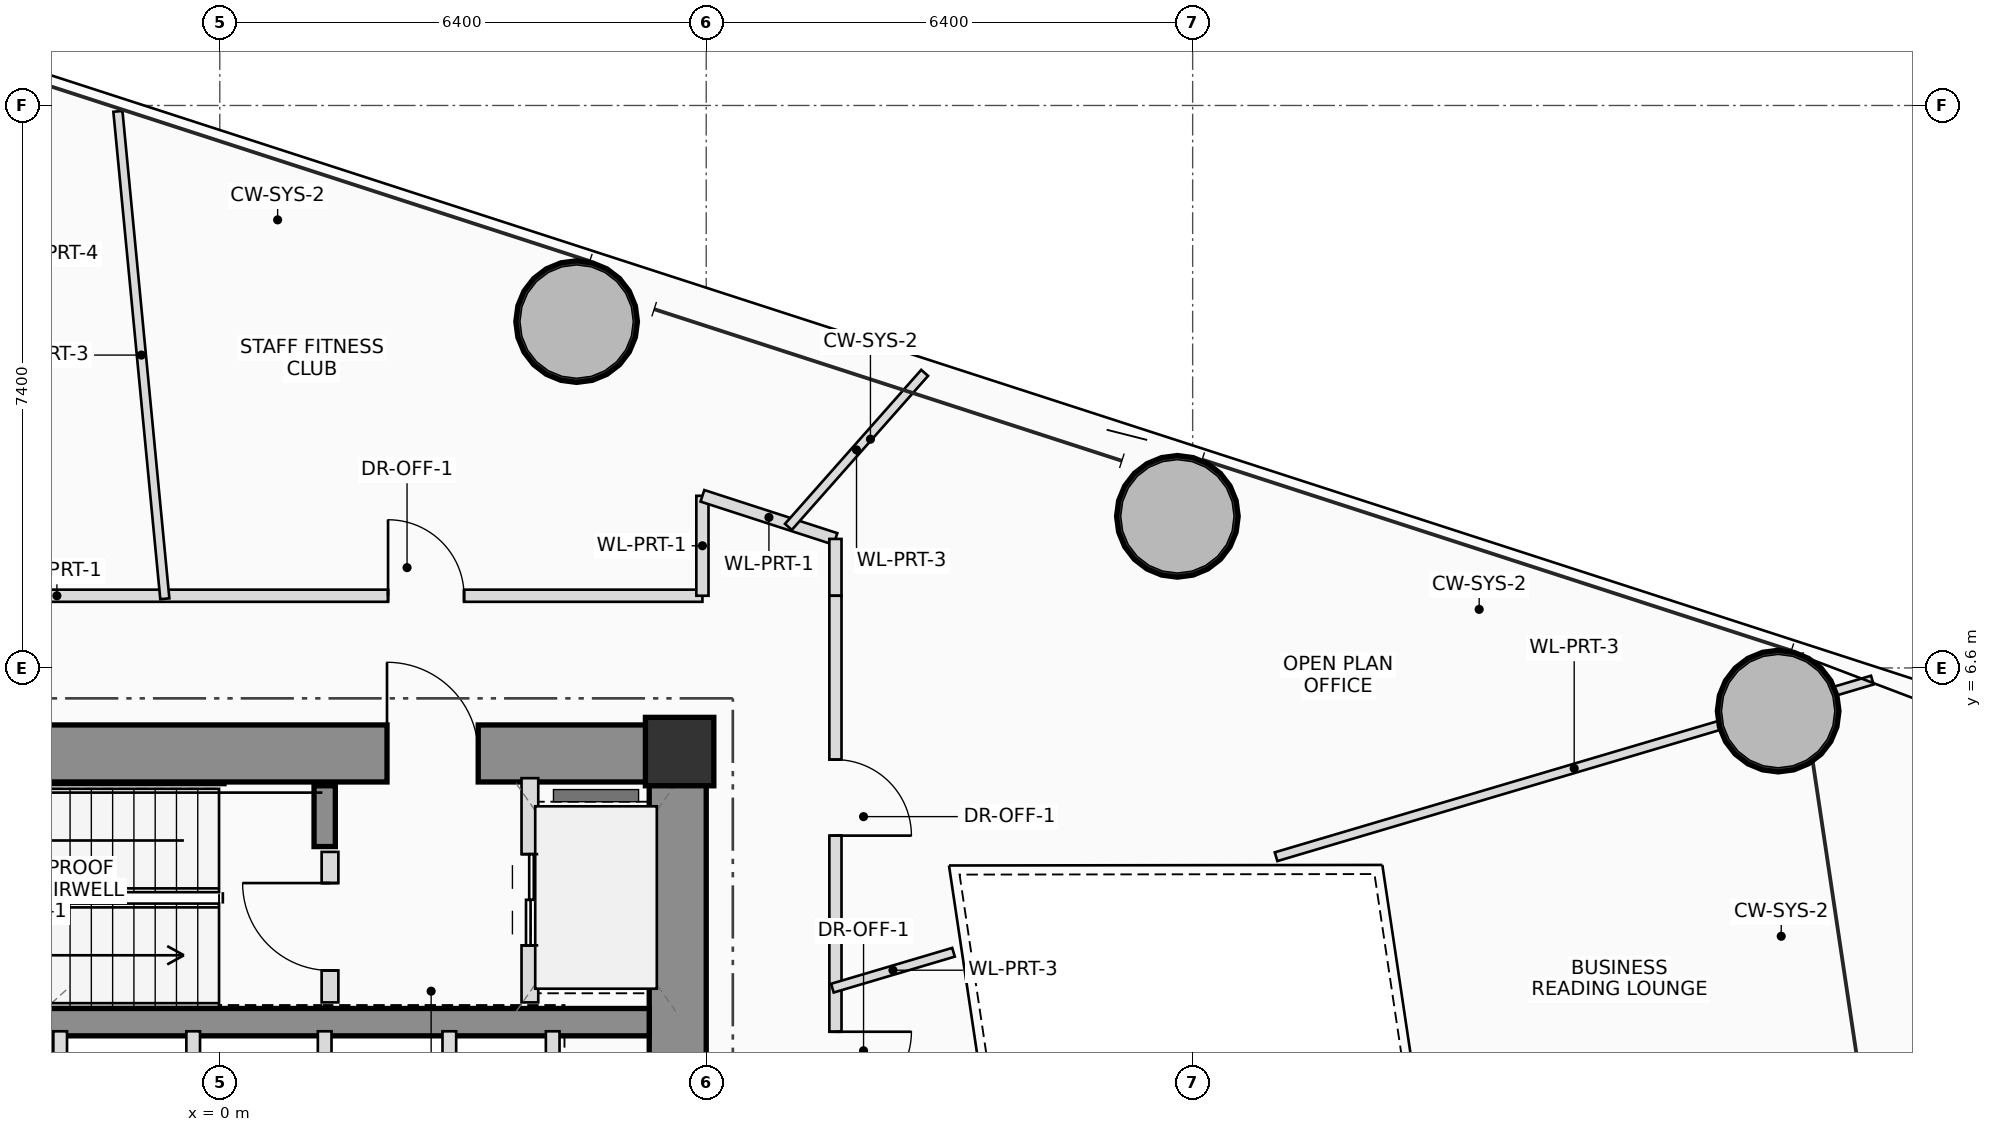
"""IFC4 building model, lengths in metres.
Left out: names, types, materials, properties, quantities, classifications, styles, units other than length and angle.
Written with IfcOpenShell. Run it as: python <this file> out.ifc"""

import sys

from ifc_helpers import new_model, si_unit, direction, frame, frame_2d, origin, origin_2d, place, context, subcontext, project, spatial, rectangle, hollow_circle, extrude, source, transform, mapped, element, fill, save


model = new_model("IFC4")
c1 = context("Model", 3, precision=1e-05, world=origin(), true_north=direction((0.0, 1.0)))
c2 = subcontext(c1, "Body", "Model", "MODEL_VIEW")
j1 = project(units=[si_unit("LENGTHUNIT", "METRE"), si_unit("PLANEANGLEUNIT", "RADIAN")], contexts=[c1])
p1 = place(None, origin())
s1 = spatial("IfcSite", under=j1, at=p1, CompositionType="ELEMENT")
p2 = place(p1, origin())
s2 = spatial("IfcBuilding", under=s1, at=p2, CompositionType="ELEMENT")
p3 = place(p2, frame((0.0, 0.0, 69.8)))
s3 = spatial("IfcBuildingStorey", under=s2, at=p3, CompositionType="ELEMENT", Elevation=69.8)
m1 = source(origin(), c2, "Body", "SweptSolid", [
    extrude(rectangle(XDim=0.9, YDim=0.9, at=origin_2d()), origin(), (0.0, 0.0, 1.0), 3.75),
])
p4 = place(p3, frame((6.05, 5.5, 0.0), z_axis=(0.0, 0.0, 1.0), x_axis=(1.0, 0.0, 0.0)))
e1 = element("IfcColumn", 1, at=p4, inside=s3, PredefinedType="COLUMN", context=c2, shape_type="MappedRepresentation", body=[
    mapped(m1, transform((0.0, 0.0, 0.0), scale=1.0)),
])
p5 = place(p3, frame((-6.4, 5.475, 0.0), z_axis=(0.0, 0.0, 1.0), x_axis=(1.0, 0.0, 0.0)))
e2 = element("IfcWall", 2, at=p5, inside=s3, PredefinedType="SHEAR", context=c2, shape_type="SweptSolid", body=[
    extrude(rectangle(XDim=12.8, YDim=0.75, at=frame_2d((6.4, 0.0))), origin(), (0.0, 0.0, 1.0), 3.75),
])
p6 = place(p5, frame((8.6, 0.0, 0.0)))
e3 = element("IfcOpeningElement", 3, at=p6, cuts=e2, PredefinedType="OPENING", context=c2, shape_type="SweptSolid", body=[
    extrude(rectangle(XDim=1.2, YDim=2.2, at=frame_2d((0.6, 1.1))), frame((0.0, 0.385, 0.0), z_axis=(0.0, -1.0, 0.0), x_axis=(1.0, 0.0, 0.0)), (0.0, 0.0, 1.0), 0.77),
])
p7 = place(p3, frame((6.025, -5.1, 0.0), z_axis=(0.0, 0.0, 1.0), x_axis=(0.0, 1.0, 0.0)))
e4 = element("IfcWall", 4, at=p7, inside=s3, PredefinedType="SHEAR", context=c2, shape_type="SweptSolid", body=[
    extrude(rectangle(XDim=10.2, YDim=0.75, at=frame_2d((5.1, 0.0))), origin(), (0.0, 0.0, 1.0), 3.75),
])
p8 = place(p3, frame((-5.65, 1.94, 0.0), z_axis=(0.0, 0.0, 1.0), x_axis=(1.0, 0.0, 0.0)))
e5 = element("IfcWall", 5, at=p8, inside=s3, PredefinedType="SHEAR", context=c2, shape_type="SweptSolid", body=[
    extrude(rectangle(XDim=11.3, YDim=0.36, at=frame_2d((5.65, 0.0))), origin(), (0.0, 0.0, 1.0), 3.75),
])
p9 = place(p3, frame((1.38, 4.25, 0.0), z_axis=(0.0, 0.0, 1.0), x_axis=(0.0, 1.0, 0.0)))
e6 = element("IfcWall", 6, at=p9, inside=s3, PredefinedType="SHEAR", context=c2, shape_type="SweptSolid", body=[
    extrude(rectangle(XDim=0.8, YDim=0.28, at=frame_2d((0.4, 0.0))), origin(), (0.0, 0.0, 1.0), 3.75),
])
m2 = source(origin(), c2, "Body", "SweptSolid", [
    extrude(hollow_circle(Radius=0.8, WallThickness=0.055, at=origin_2d()), origin(), (0.0, 0.0, 1.0), 3.75),
])
for number, where, z_axis, x_axis in (
    (7, (20.503, 6.032, 0.0), (0.0, 0.0, 1.0), (1.0, 0.0, 0.0)),
    (8, (12.599, 8.594, 0.0), (0.0, 0.0, 1.0), (1.0, 0.0, 0.0)),
    (9, (4.695, 11.157, 0.0), (0.0, 0.0, 1.0), (1.0, 0.0, 0.0)),
):
    element("IfcColumn", number, at=place(p3, frame(where, z_axis=z_axis, x_axis=x_axis)), inside=s3, PredefinedType="COLUMN", context=c2, shape_type="MappedRepresentation", body=[
        mapped(m2, transform((0.0, 0.0, 0.0), scale=1.0)),
    ])
p10 = place(p3, frame((1.45, 2.2, 0.0), z_axis=(0.0, 0.0, 1.0), x_axis=(0.0, 1.0, 0.0)))
e10 = element("IfcWall", 10, at=p10, inside=s3, PredefinedType="PLUMBINGWALL", context=c2, shape_type="SweptSolid", body=[
    extrude(rectangle(XDim=1.98, YDim=0.22, at=frame_2d((0.99, 0.0))), origin(), (0.0, 0.0, 1.0), 3.545),
])
p11 = place(p10, frame((0.42, 0.0, 0.0)))
e11 = element("IfcOpeningElement", 11, at=p11, cuts=e10, PredefinedType="OPENING", context=c2, shape_type="SweptSolid", body=[
    extrude(rectangle(XDim=1.15, YDim=2.15, at=frame_2d((0.575, 1.075))), frame((0.0, 0.12, 0.0), z_axis=(0.0, -1.0, 0.0), x_axis=(1.0, 0.0, 0.0)), (0.0, 0.0, 1.0), 0.24),
])
p12 = place(p3, frame((4.08, 2.2, 0.0), z_axis=(0.0, 0.0, 1.0), x_axis=(0.0, 1.0, 0.0)))
e12 = element("IfcWall", 12, at=p12, inside=s3, PredefinedType="PLUMBINGWALL", context=c2, shape_type="SweptSolid", body=[
    extrude(rectangle(XDim=2.95, YDim=0.22, at=frame_2d((1.475, 0.0))), origin(), (0.0, 0.0, 1.0), 3.545),
])
p13 = place(p12, frame((0.75, 0.0, 0.0)))
e13 = element("IfcOpeningElement", 13, at=p13, cuts=e12, PredefinedType="OPENING", context=c2, shape_type="SweptSolid", body=[
    extrude(rectangle(XDim=1.2, YDim=2.25, at=frame_2d((0.6, 1.125))), frame((0.0, 0.12, 0.0), z_axis=(0.0, -1.0, 0.0), x_axis=(1.0, 0.0, 0.0)), (0.0, 0.0, 1.0), 0.24),
])
for number, where, z_axis, x_axis in (
    (14, (-2.1, 0.84, 0.0), (0.0, 0.0, 1.0), (0.0, 1.0, 0.0)),
    (15, (-0.35, 0.84, 0.0), (0.0, 0.0, 1.0), (0.0, 1.0, 0.0)),
    (16, (1.38, 0.84, 0.0), (0.0, 0.0, 1.0), (0.0, 1.0, 0.0)),
    (17, (3.02, 0.84, 0.0), (0.0, 0.0, 1.0), (0.0, 1.0, 0.0)),
    (18, (4.38, 0.84, 0.0), (0.0, 0.0, 1.0), (0.0, 1.0, 0.0)),
):
    element("IfcWall", number, at=place(p3, frame(where, z_axis=z_axis, x_axis=x_axis)), inside=s3, PredefinedType="PLUMBINGWALL", context=c2, shape_type="SweptSolid", body=[
        extrude(rectangle(XDim=0.98, YDim=0.18, at=frame_2d((0.49, 0.0))), origin(), (0.0, 0.0, 1.0), 3.545),
    ])
p14 = place(p3, frame((-6.35, 7.55, 0.0), z_axis=(0.0, 0.0, 1.0), x_axis=(1.0, 0.0, 0.0)))
e19 = element("IfcWall", 19, at=p14, inside=s3, PredefinedType="PARTITIONING", context=c2, shape_type="SweptSolid", body=[
    extrude(rectangle(XDim=12.7, YDim=0.16, at=frame_2d((6.35, 0.0))), origin(), (0.0, 0.0, 1.0), 2.85),
])
p15 = place(p14, frame((8.564, 0.0, 0.0)))
e20 = element("IfcOpeningElement", 20, at=p15, cuts=e19, PredefinedType="OPENING", context=c2, shape_type="SweptSolid", body=[
    extrude(rectangle(XDim=1.0, YDim=2.25, at=frame_2d((0.5, 1.125))), frame((0.0, 0.09, 0.0), z_axis=(0.0, -1.0, 0.0), x_axis=(1.0, 0.0, 0.0)), (0.0, 0.0, 1.0), 0.18),
])
p16 = place(p3, frame((6.35, 7.55, 0.0), z_axis=(0.0, 0.0, 1.0), x_axis=(0.0, 1.0, 0.0)))
e21 = element("IfcWall", 21, at=p16, inside=s3, PredefinedType="PARTITIONING", context=c2, shape_type="SweptSolid", body=[
    extrude(rectangle(XDim=1.315, YDim=0.16, at=frame_2d((0.657, 0.0))), origin(), (0.0, 0.0, 1.0), 3.05),
])
p17 = place(p3, frame((6.35, 8.865, 0.0), z_axis=(0.0, 0.0, 1.0), x_axis=(0.951291213681, -0.308293734568, 0.0)))
e22 = element("IfcWall", 22, at=p17, inside=s3, PredefinedType="PARTITIONING", context=c2, shape_type="SweptSolid", body=[
    extrude(rectangle(XDim=1.84, YDim=0.16, at=frame_2d((0.92, 0.0))), origin(), (0.0, 0.0, 1.0), 3.2),
])
p18 = place(p3, frame((8.1, 8.298, 0.0), z_axis=(0.0, 0.0, 1.0), x_axis=(0.0, -1.0, 0.0)))
e23 = element("IfcWall", 23, at=p18, inside=s3, PredefinedType="PARTITIONING", context=c2, shape_type="SweptSolid", body=[
    extrude(rectangle(XDim=0.748, YDim=0.16, at=frame_2d((0.374, 0.0))), origin(), (0.0, 0.0, 1.0), 3.545),
])
p19 = place(p3, frame((8.1, 7.55, 0.0), z_axis=(0.0, 0.0, 1.0), x_axis=(0.0, -1.0, 0.0)))
e24 = element("IfcWall", 24, at=p19, inside=s3, PredefinedType="PARTITIONING", context=c2, shape_type="SweptSolid", body=[
    extrude(rectangle(XDim=7.53, YDim=0.16, at=frame_2d((3.765, 0.0))), origin(), (0.0, 0.0, 1.0), 2.85),
])
p20 = place(p19, frame((2.156, 0.0, 0.0)))
e25 = element("IfcOpeningElement", 25, at=p20, cuts=e24, PredefinedType="OPENING", context=c2, shape_type="SweptSolid", body=[
    extrude(rectangle(XDim=1.0, YDim=2.25, at=frame_2d((0.5, 1.125))), frame((0.0, 0.09, 0.0), z_axis=(0.0, -1.0, 0.0), x_axis=(1.0, 0.0, 0.0)), (0.0, 0.0, 1.0), 0.18),
])
p21 = place(p19, frame((5.736, 0.0, 0.0)))
e26 = element("IfcOpeningElement", 26, at=p21, cuts=e24, PredefinedType="OPENING", context=c2, shape_type="SweptSolid", body=[
    extrude(rectangle(XDim=1.0, YDim=2.25, at=frame_2d((0.5, 1.125))), frame((0.0, 0.09, 0.0), z_axis=(0.0, -1.0, 0.0), x_axis=(1.0, 0.0, 0.0)), (0.0, 0.0, 1.0), 0.18),
])
p22 = place(p3, frame((-0.723, 7.51, 0.0), z_axis=(0.0, 0.0, 1.0), x_axis=(-0.095840941038, 0.995396661648, 0.0)))
e27 = element("IfcWall", 27, at=p22, inside=s3, PredefinedType="PARTITIONING", context=c2, shape_type="SweptSolid", body=[
    extrude(rectangle(XDim=6.442, YDim=0.12, at=frame_2d((3.221, 0.0))), origin(), (0.0, 0.0, 1.0), 3.01),
])
p23 = place(p3, frame((8.06, 2.387, 0.0), z_axis=(0.0, 0.0, 1.0), x_axis=(0.958783289971, 0.28413835164, 0.0)))
e28 = element("IfcWall", 28, at=p23, inside=s3, PredefinedType="PARTITIONING", context=c2, shape_type="SweptSolid", body=[
    extrude(rectangle(XDim=1.662, YDim=0.12, at=frame_2d((0.831, 0.0))), origin(), (0.0, 0.0, 1.0), 3.21),
])
p24 = place(p3, frame((13.897, 4.117, 0.0), z_axis=(0.0, 0.0, 1.0), x_axis=(0.958827308203, 0.283989776303, 0.0)))
e29 = element("IfcWall", 29, at=p24, inside=s3, PredefinedType="PARTITIONING", context=c2, shape_type="SweptSolid", body=[
    extrude(rectangle(XDim=8.182, YDim=0.12, at=frame_2d((4.091, 0.0))), origin(), (0.0, 0.0, 1.0), 2.85),
])
p25 = place(p3, frame((7.481, 8.456, 0.0), z_axis=(0.0, 0.0, 1.0), x_axis=(0.662647880096, 0.7489310963, 0.0)))
e30 = element("IfcWall", 30, at=p25, inside=s3, PredefinedType="PARTITIONING", context=c2, shape_type="SweptSolid", body=[
    extrude(rectangle(XDim=2.705, YDim=0.12, at=frame_2d((1.353, 0.0))), origin(), (0.0, 0.0, 1.0), 3.01),
])
p26 = place(p6, origin())
e31 = element("IfcDoor", 31, at=p26, inside=s3, OperationType="SINGLE_SWING_LEFT", PredefinedType="DOOR", context=c2, shape_type="SweptSolid", body=[
    extrude(rectangle(XDim=1.2, YDim=2.2, at=frame_2d((0.6, 1.1))), frame((0.0, 0.025, 0.0), z_axis=(0.0, -1.0, 0.0), x_axis=(1.0, 0.0, 0.0)), (0.0, 0.0, 1.0), 0.05),
])
fill(e3, e31)
p27 = place(p11, origin())
e32 = element("IfcDoor", 32, at=p27, inside=s3, OperationType="SINGLE_SWING_RIGHT", PredefinedType="DOOR", context=c2, shape_type="SweptSolid", body=[
    extrude(rectangle(XDim=1.15, YDim=2.15, at=frame_2d((0.575, 1.075))), frame((0.0, 0.025, 0.0), z_axis=(0.0, -1.0, 0.0), x_axis=(1.0, 0.0, 0.0)), (0.0, 0.0, 1.0), 0.05),
])
fill(e11, e32)
p28 = place(p13, origin())
e33 = element("IfcDoor", 33, at=p28, inside=s3, OperationType="DOUBLE_DOOR_SLIDING", PredefinedType="DOOR", context=c2, shape_type="SweptSolid", body=[
    extrude(rectangle(XDim=1.2, YDim=2.25, at=frame_2d((0.6, 1.125))), frame((0.0, 0.025, 0.0), z_axis=(0.0, -1.0, 0.0), x_axis=(1.0, 0.0, 0.0)), (0.0, 0.0, 1.0), 0.05),
])
fill(e13, e33)
p29 = place(p15, origin())
e34 = element("IfcDoor", 34, at=p29, inside=s3, OperationType="SINGLE_SWING_LEFT", PredefinedType="DOOR", context=c2, shape_type="SweptSolid", body=[
    extrude(rectangle(XDim=1.0, YDim=2.25, at=frame_2d((0.5, 1.125))), frame((0.0, 0.025, 0.0), z_axis=(0.0, -1.0, 0.0), x_axis=(1.0, 0.0, 0.0)), (0.0, 0.0, 1.0), 0.05),
])
fill(e20, e34)
p30 = place(p20, origin())
e35 = element("IfcDoor", 35, at=p30, inside=s3, OperationType="SINGLE_SWING_RIGHT", PredefinedType="DOOR", context=c2, shape_type="SweptSolid", body=[
    extrude(rectangle(XDim=1.0, YDim=2.25, at=frame_2d((0.5, 1.125))), frame((0.0, 0.025, 0.0), z_axis=(0.0, -1.0, 0.0), x_axis=(1.0, 0.0, 0.0)), (0.0, 0.0, 1.0), 0.05),
])
fill(e25, e35)
p31 = place(p21, origin())
e36 = element("IfcDoor", 36, at=p31, inside=s3, OperationType="SINGLE_SWING_LEFT", PredefinedType="DOOR", context=c2, shape_type="SweptSolid", body=[
    extrude(rectangle(XDim=1.0, YDim=2.25, at=frame_2d((0.5, 1.125))), frame((0.0, 0.025, 0.0), z_axis=(0.0, -1.0, 0.0), x_axis=(1.0, 0.0, 0.0)), (0.0, 0.0, 1.0), 0.05),
])
fill(e26, e36)
save(model, sys.argv[1])
